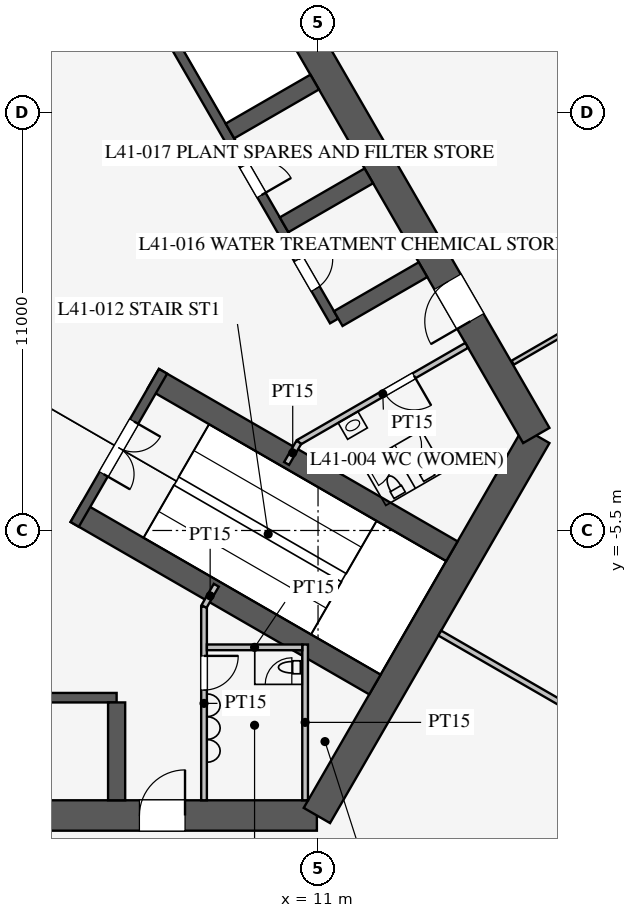
"""IFC4 building model, lengths in metres.
Left out: names, types, materials, properties, quantities, classifications, styles, units other than length and angle.
Written with IfcOpenShell. Run it as: python <this file> out.ifc"""

import sys

from ifc_helpers import new_model, si_unit, direction, frame, frame_2d, origin, place, context, subcontext, project, spatial, rectangle, extrude, element, fill, save


model = new_model("IFC4")
c1 = context("Model", 3, precision=1e-05, world=origin(), true_north=direction((0.0, 1.0)))
c2 = subcontext(c1, "Body", "Model", "MODEL_VIEW")
j1 = project(units=[si_unit("LENGTHUNIT", "METRE"), si_unit("PLANEANGLEUNIT", "RADIAN")], contexts=[c1])
p1 = place(None, origin())
s1 = spatial("IfcSite", under=j1, at=p1, CompositionType="ELEMENT")
p2 = place(p1, origin())
s2 = spatial("IfcBuilding", under=s1, at=p2, CompositionType="ELEMENT")
p3 = place(p2, frame((0.0, 0.0, 178.7)))
s3 = spatial("IfcBuildingStorey", under=s2, at=p3, CompositionType="ELEMENT", Elevation=178.7)
p4 = place(p3, frame((-10.97, -13.0, 0.0), z_axis=(0.0, 0.0, 1.0), x_axis=(1.0, 0.0, 0.0)))
e1 = element("IfcWall", 1, at=p4, inside=s3, PredefinedType="SHEAR", context=c2, shape_type="SweptSolid", body=[
    extrude(rectangle(XDim=21.939, YDim=0.8, at=frame_2d((10.97, 0.0))), origin(), (0.0, 0.0, 1.0), 6.0),
])
p5 = place(p4, frame((17.27, 0.0, 0.0)))
e2 = element("IfcOpeningElement", 2, at=p5, cuts=e1, PredefinedType="OPENING", context=c2, shape_type="SweptSolid", body=[
    extrude(rectangle(XDim=1.2, YDim=2.1, at=frame_2d((0.6, 1.05))), frame((0.0, 0.41, 0.0), z_axis=(0.0, -1.0, 0.0), x_axis=(1.0, 0.0, 0.0)), (0.0, 0.0, 1.0), 0.82),
])
p6 = place(p4, frame((3.47, 0.0, 0.0)))
e3 = element("IfcOpeningElement", 3, at=p6, cuts=e1, PredefinedType="OPENING", context=c2, shape_type="SweptSolid", body=[
    extrude(rectangle(XDim=1.2, YDim=2.1, at=frame_2d((0.6, 1.05))), frame((0.0, 0.41, 0.0), z_axis=(0.0, -1.0, 0.0), x_axis=(1.0, 0.0, 0.0)), (0.0, 0.0, 1.0), 0.82),
])
p7 = place(p3, frame((10.97, -13.0, 0.0), z_axis=(0.0, 0.0, 1.0), x_axis=(0.499995765644, 0.866027848477, 0.0)))
e4 = element("IfcWall", 4, at=p7, inside=s3, PredefinedType="SHEAR", context=c2, shape_type="SweptSolid", body=[
    extrude(rectangle(XDim=11.547, YDim=0.8, at=frame_2d((5.773, 0.0))), origin(), (0.0, 0.0, 1.0), 6.0),
])
p8 = place(p3, frame((16.743, -3.0, 0.0), z_axis=(0.0, 0.0, 1.0), x_axis=(-0.500002442456, 0.866023993627, 0.0)))
e5 = element("IfcWall", 5, at=p8, inside=s3, PredefinedType="SHEAR", context=c2, shape_type="SweptSolid", body=[
    extrude(rectangle(XDim=21.939, YDim=0.8, at=frame_2d((10.97, 0.0))), origin(), (0.0, 0.0, 1.0), 6.0),
])
p9 = place(p8, frame((17.27, 0.0, 0.0)))
e6 = element("IfcOpeningElement", 6, at=p9, cuts=e5, PredefinedType="OPENING", context=c2, shape_type="SweptSolid", body=[
    extrude(rectangle(XDim=1.2, YDim=2.1, at=frame_2d((0.6, 1.05))), frame((0.0, 0.41, 0.0), z_axis=(0.0, -1.0, 0.0), x_axis=(1.0, 0.0, 0.0)), (0.0, 0.0, 1.0), 0.82),
])
p10 = place(p8, frame((3.47, 0.0, 0.0)))
e7 = element("IfcOpeningElement", 7, at=p10, cuts=e5, PredefinedType="OPENING", context=c2, shape_type="SweptSolid", body=[
    extrude(rectangle(XDim=1.2, YDim=2.1, at=frame_2d((0.6, 1.05))), frame((0.0, 0.41, 0.0), z_axis=(0.0, -1.0, 0.0), x_axis=(1.0, 0.0, 0.0)), (0.0, 0.0, 1.0), 0.82),
])
p11 = place(p3, frame((-5.7, -9.9, 0.0), z_axis=(0.0, 0.0, 1.0), x_axis=(1.0, 0.0, 0.0)))
e8 = element("IfcWall", 8, at=p11, inside=s3, PredefinedType="SHEAR", context=c2, shape_type="SweptSolid", body=[
    extrude(rectangle(XDim=11.4, YDim=0.25, at=frame_2d((5.7, 0.0))), origin(), (0.0, 0.0, 1.0), 6.0),
])
p12 = place(p3, frame((5.7, -10.025, 0.0), z_axis=(0.0, 0.0, 1.0), x_axis=(0.0, -1.0, 0.0)))
e9 = element("IfcWall", 9, at=p12, inside=s3, PredefinedType="SHEAR", context=c2, shape_type="SweptSolid", body=[
    extrude(rectangle(XDim=2.575, YDim=0.45, at=frame_2d((1.288, 0.0))), origin(), (0.0, 0.0, 1.0), 6.0),
])
p13 = place(p3, frame((11.424, 0.014, 0.0), z_axis=(0.0, 0.0, 1.0), x_axis=(-0.500001763848, 0.866024385424, 0.0)))
e10 = element("IfcWall", 10, at=p13, inside=s3, PredefinedType="SHEAR", context=c2, shape_type="SweptSolid", body=[
    extrude(rectangle(XDim=11.4, YDim=0.25, at=frame_2d((5.7, 0.0))), origin(), (0.0, 0.0, 1.0), 6.0),
])
p14 = place(p13, frame((0.975, 0.0, 0.0)))
e11 = element("IfcOpeningElement", 11, at=p14, cuts=e10, PredefinedType="OPENING", context=c2, shape_type="SweptSolid", body=[
    extrude(rectangle(XDim=0.9, YDim=2.1, at=frame_2d((0.45, 1.05))), frame((0.0, 0.135, 0.0), z_axis=(0.0, -1.0, 0.0), x_axis=(1.0, 0.0, 0.0)), (0.0, 0.0, 1.0), 0.27),
])
p15 = place(p13, frame((3.825, 0.0, 0.0)))
e12 = element("IfcOpeningElement", 12, at=p15, cuts=e10, PredefinedType="OPENING", context=c2, shape_type="SweptSolid", body=[
    extrude(rectangle(XDim=0.9, YDim=2.1, at=frame_2d((0.45, 1.05))), frame((0.0, 0.135, 0.0), z_axis=(0.0, -1.0, 0.0), x_axis=(1.0, 0.0, 0.0)), (0.0, 0.0, 1.0), 0.27),
])
for number, where, z_axis, x_axis in (
    (13, (11.532, 0.076, 0.0), (0.0, 0.0, 1.0), (0.866, 0.5, 0.0)),
    (14, (10.107, 2.544, 0.0), (0.0, 0.0, 1.0), (0.866, 0.5, 0.0)),
    (15, (8.682, 5.012, 0.0), (0.0, 0.0, 1.0), (0.866, 0.5, 0.0)),
):
    element("IfcWall", number, at=place(p3, frame(where, z_axis=z_axis, x_axis=x_axis)), inside=s3, PredefinedType="SHEAR", context=c2, shape_type="SweptSolid", body=[
        extrude(rectangle(XDim=2.575, YDim=0.45, at=frame_2d((1.288, 0.0))), origin(), (0.0, 0.0, 1.0), 6.0),
    ])
for number, where, z_axis, x_axis in (
    (16, (4.638, -5.016, 0.0), (0.0, 0.0, 1.0), (0.866, -0.5, 0.0)),
    (17, (6.663, -1.509, 0.0), (0.0, 0.0, 1.0), (0.866, -0.5, 0.0)),
):
    element("IfcWall", number, at=place(p3, frame(where, z_axis=z_axis, x_axis=x_axis)), inside=s3, PredefinedType="SHEAR", context=c2, shape_type="SweptSolid", body=[
        extrude(rectangle(XDim=9.075, YDim=0.6, at=frame_2d((4.538, 0.0))), origin(), (0.0, 0.0, 1.0), 6.0),
    ])
p16 = place(p3, frame((4.597, -5.339, 0.0), z_axis=(0.0, 0.0, 1.0), x_axis=(0.499984536904, 0.866034331223, 0.0)))
e18 = element("IfcWall", 18, at=p16, inside=s3, PredefinedType="SHEAR", context=c2, shape_type="SweptSolid", body=[
    extrude(rectangle(XDim=4.65, YDim=0.25, at=frame_2d((2.325, 0.0))), origin(), (0.0, 0.0, 1.0), 6.0),
])
p17 = place(p16, frame((1.525, 0.0, 0.0)))
e19 = element("IfcOpeningElement", 19, at=p17, cuts=e18, PredefinedType="OPENING", context=c2, shape_type="SweptSolid", body=[
    extrude(rectangle(XDim=1.6, YDim=2.1, at=frame_2d((0.8, 1.05))), frame((0.0, 0.135, 0.0), z_axis=(0.0, -1.0, 0.0), x_axis=(1.0, 0.0, 0.0)), (0.0, 0.0, 1.0), 0.27),
])
p18 = place(p3, frame((8.0, -7.5, 0.0), z_axis=(0.0, 0.0, 1.0), x_axis=(0.0, -1.0, 0.0)))
e20 = element("IfcWall", 20, at=p18, inside=s3, PredefinedType="PARTITIONING", context=c2, shape_type="SweptSolid", body=[
    extrude(rectangle(XDim=5.1, YDim=0.15, at=frame_2d((2.55, 0.0))), origin(), (0.0, 0.0, 1.0), 5.8),
])
p19 = place(p18, frame((1.3, 0.0, 0.0)))
e21 = element("IfcOpeningElement", 21, at=p19, cuts=e20, PredefinedType="OPENING", context=c2, shape_type="SweptSolid", body=[
    extrude(rectangle(XDim=0.9, YDim=2.1, at=frame_2d((0.45, 1.05))), frame((0.0, 0.085, 0.0), z_axis=(0.0, -1.0, 0.0), x_axis=(1.0, 0.0, 0.0)), (0.0, 0.0, 1.0), 0.17),
])
p20 = place(p3, frame((10.495, -3.178, 0.0), z_axis=(0.0, 0.0, 1.0), x_axis=(0.86602216432, 0.500005610874, 0.0)))
e22 = element("IfcWall", 22, at=p20, inside=s3, PredefinedType="PARTITIONING", context=c2, shape_type="SweptSolid", body=[
    extrude(rectangle(XDim=5.1, YDim=0.15, at=frame_2d((2.55, 0.0))), origin(), (0.0, 0.0, 1.0), 5.8),
])
p21 = place(p20, frame((2.6, 0.0, 0.0)))
e23 = element("IfcOpeningElement", 23, at=p21, cuts=e22, PredefinedType="OPENING", context=c2, shape_type="SweptSolid", body=[
    extrude(rectangle(XDim=0.9, YDim=2.1, at=frame_2d((0.45, 1.05))), frame((0.0, 0.085, 0.0), z_axis=(0.0, -1.0, 0.0), x_axis=(1.0, 0.0, 0.0)), (0.0, 0.0, 1.0), 0.17),
])
for number, where, z_axis, x_axis in (
    (24, (8.0, -7.5, 0.0), (0.0, 0.0, 1.0), (0.5, 0.866, 0.0)),
    (25, (10.495, -3.178, 0.0), (0.0, 0.0, 1.0), (-0.5, -0.866, 0.0)),
):
    element("IfcWall", number, at=place(p3, frame(where, z_axis=z_axis, x_axis=x_axis)), inside=s3, PredefinedType="PARTITIONING", context=c2, shape_type="SweptSolid", body=[
        extrude(rectangle(XDim=0.645, YDim=0.15, at=frame_2d((0.323, 0.0))), origin(), (0.0, 0.0, 1.0), 5.8),
    ])
p22 = place(p3, frame((10.66, -8.5, 0.0), z_axis=(0.0, 0.0, 1.0), x_axis=(0.0, -1.0, 0.0)))
e26 = element("IfcWall", 26, at=p22, inside=s3, PredefinedType="PARTITIONING", context=c2, shape_type="SweptSolid", body=[
    extrude(rectangle(XDim=4.1, YDim=0.15, at=frame_2d((2.05, 0.0))), origin(), (0.0, 0.0, 1.0), 5.8),
])
p23 = place(p3, frame((8.075, -8.575, 0.0), z_axis=(0.0, 0.0, 1.0), x_axis=(1.0, 0.0, 0.0)))
e27 = element("IfcWall", 27, at=p23, inside=s3, PredefinedType="PARTITIONING", context=c2, shape_type="SweptSolid", body=[
    extrude(rectangle(XDim=2.51, YDim=0.15, at=frame_2d((1.255, 0.0))), origin(), (0.0, 0.0, 1.0), 5.8),
])
p24 = place(p3, frame((14.203, -8.2, 0.0), z_axis=(0.0, 0.0, 1.0), x_axis=(0.866021600284, -0.500006587798, 0.0)))
e28 = element("IfcWall", 28, at=p24, inside=s3, PredefinedType="PARTITIONING", context=c2, shape_type="SweptSolid", body=[
    extrude(rectangle(XDim=14.95, YDim=0.15, at=frame_2d((7.475, 0.0))), origin(), (0.0, 0.0, 1.0), 4.2),
])
p25 = place(p3, frame((16.122, -1.084, 0.0), z_axis=(0.0, 0.0, 1.0), x_axis=(0.866025583565, 0.49999968861, 0.0)))
e29 = element("IfcWall", 29, at=p25, inside=s3, PredefinedType="PARTITIONING", context=c2, shape_type="SweptSolid", body=[
    extrude(rectangle(XDim=10.393, YDim=0.12, at=frame_2d((5.196, 0.0))), origin(), (0.0, 0.0, 1.0), 2.9),
])
p26 = place(p25, frame((2.35, 0.0, 0.0)))
e30 = element("IfcOpeningElement", 30, at=p26, cuts=e29, PredefinedType="OPENING", context=c2, shape_type="SweptSolid", body=[
    extrude(rectangle(XDim=0.9, YDim=2.1, at=frame_2d((0.45, 1.05))), frame((0.0, 0.07, 0.0), z_axis=(0.0, -1.0, 0.0), x_axis=(1.0, 0.0, 0.0)), (0.0, 0.0, 1.0), 0.14),
])
p27 = place(p19, origin())
e31 = element("IfcDoor", 31, at=p27, inside=s3, OperationType="SINGLE_SWING_LEFT", PredefinedType="DOOR", context=c2, shape_type="SweptSolid", body=[
    extrude(rectangle(XDim=0.9, YDim=2.1, at=frame_2d((0.45, 1.05))), frame((0.0, 0.025, 0.0), z_axis=(0.0, -1.0, 0.0), x_axis=(1.0, 0.0, 0.0)), (0.0, 0.0, 1.0), 0.05),
])
fill(e21, e31)
p28 = place(p21, frame((0.9, 0.0, 0.0), z_axis=(0.0, 0.0, 1.0), x_axis=(-1.0, 0.0, 0.0)))
e32 = element("IfcDoor", 32, at=p28, inside=s3, OperationType="SINGLE_SWING_LEFT", PredefinedType="DOOR", context=c2, shape_type="SweptSolid", body=[
    extrude(rectangle(XDim=0.9, YDim=2.1, at=frame_2d((0.45, 1.05))), frame((0.0, 0.025, 0.0), z_axis=(0.0, -1.0, 0.0), x_axis=(1.0, 0.0, 0.0)), (0.0, 0.0, 1.0), 0.05),
])
fill(e23, e32)
p29 = place(p17, frame((1.6, 0.0, 0.0), z_axis=(0.0, 0.0, 1.0), x_axis=(-1.0, 0.0, 0.0)))
e33 = element("IfcDoor", 33, at=p29, inside=s3, OperationType="DOUBLE_DOOR_SINGLE_SWING", PredefinedType="DOOR", context=c2, shape_type="SweptSolid", body=[
    extrude(rectangle(XDim=1.6, YDim=2.1, at=frame_2d((0.8, 1.05))), frame((0.0, 0.025, 0.0), z_axis=(0.0, -1.0, 0.0), x_axis=(1.0, 0.0, 0.0)), (0.0, 0.0, 1.0), 0.05),
])
fill(e19, e33)
p30 = place(p5, origin())
e34 = element("IfcDoor", 34, at=p30, inside=s3, OperationType="SINGLE_SWING_RIGHT", PredefinedType="DOOR", context=c2, shape_type="SweptSolid", body=[
    extrude(rectangle(XDim=1.2, YDim=2.1, at=frame_2d((0.6, 1.05))), frame((0.0, 0.025, 0.0), z_axis=(0.0, -1.0, 0.0), x_axis=(1.0, 0.0, 0.0)), (0.0, 0.0, 1.0), 0.05),
])
fill(e2, e34)
p31 = place(p10, origin())
e35 = element("IfcDoor", 35, at=p31, inside=s3, OperationType="SINGLE_SWING_LEFT", PredefinedType="DOOR", context=c2, shape_type="SweptSolid", body=[
    extrude(rectangle(XDim=1.2, YDim=2.1, at=frame_2d((0.6, 1.05))), frame((0.0, 0.025, 0.0), z_axis=(0.0, -1.0, 0.0), x_axis=(1.0, 0.0, 0.0)), (0.0, 0.0, 1.0), 0.05),
])
fill(e7, e35)
p32 = place(p14, frame((0.9, 0.0, 0.0), z_axis=(0.0, 0.0, 1.0), x_axis=(-1.0, 0.0, 0.0)))
e36 = element("IfcDoor", 36, at=p32, inside=s3, OperationType="SINGLE_SWING_LEFT", PredefinedType="DOOR", context=c2, shape_type="SweptSolid", body=[
    extrude(rectangle(XDim=0.9, YDim=2.1, at=frame_2d((0.45, 1.05))), frame((0.0, 0.025, 0.0), z_axis=(0.0, -1.0, 0.0), x_axis=(1.0, 0.0, 0.0)), (0.0, 0.0, 1.0), 0.05),
])
fill(e11, e36)
p33 = place(p15, frame((0.9, 0.0, 0.0), z_axis=(0.0, 0.0, 1.0), x_axis=(-1.0, 0.0, 0.0)))
e37 = element("IfcDoor", 37, at=p33, inside=s3, OperationType="SINGLE_SWING_RIGHT", PredefinedType="DOOR", context=c2, shape_type="SweptSolid", body=[
    extrude(rectangle(XDim=0.9, YDim=2.1, at=frame_2d((0.45, 1.05))), frame((0.0, 0.025, 0.0), z_axis=(0.0, -1.0, 0.0), x_axis=(1.0, 0.0, 0.0)), (0.0, 0.0, 1.0), 0.05),
])
fill(e12, e37)
save(model, sys.argv[1])
